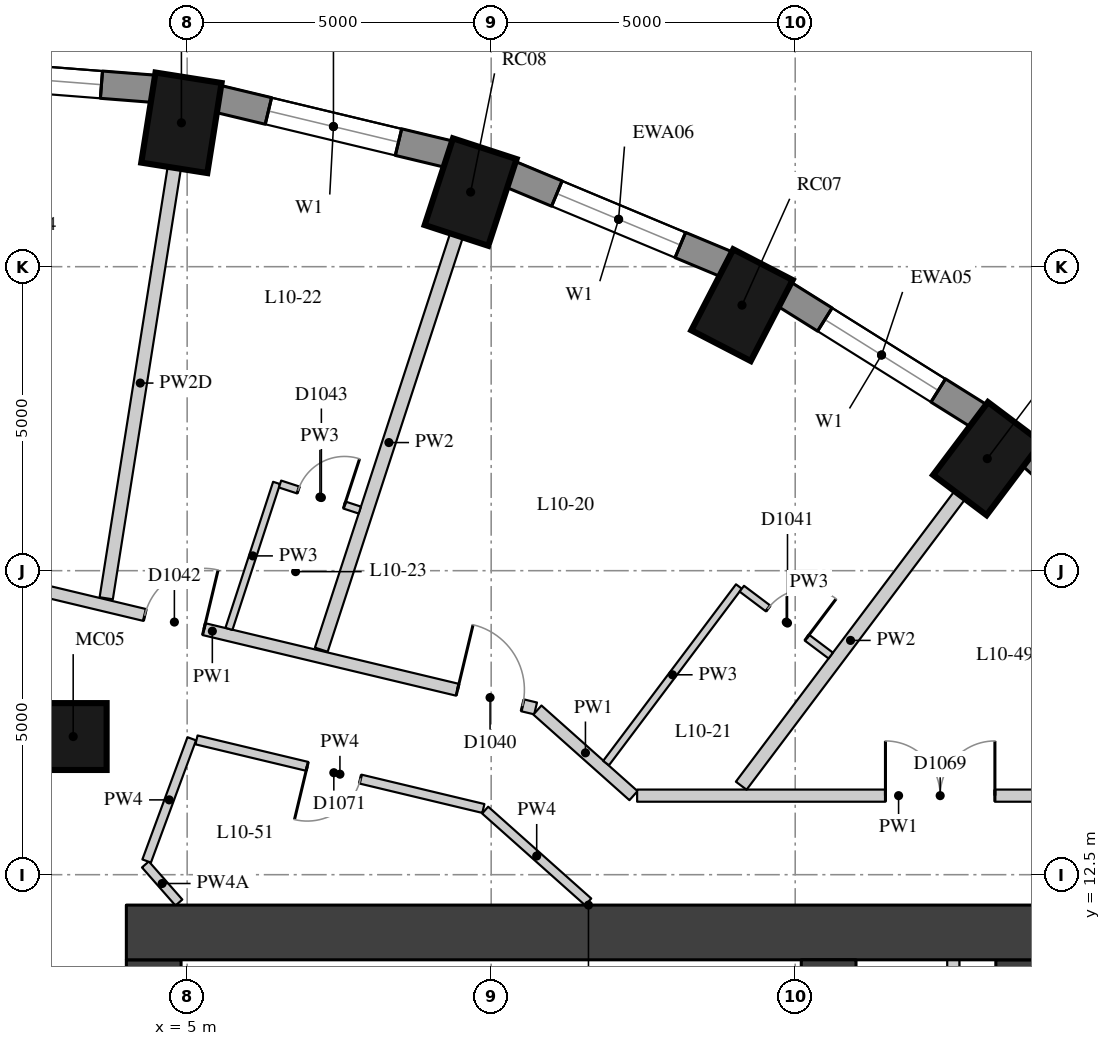
"""IFC4 building model, lengths in metres.
Left out: names, types, materials, properties, quantities, classifications, styles, units other than length and angle.
Written with IfcOpenShell. Run it as: python <this file> out.ifc"""

import sys

from ifc_helpers import new_model, si_unit, direction, frame, frame_2d, origin, origin_2d, place, context, subcontext, project, spatial, rectangle, extrude, element, fill, save


model = new_model("IFC4")
c1 = context("Model", 3, precision=1e-05, world=origin(), true_north=direction((0.0, 1.0)))
c2 = subcontext(c1, "Body", "Model", "MODEL_VIEW")
j1 = project(units=[si_unit("LENGTHUNIT", "METRE"), si_unit("PLANEANGLEUNIT", "RADIAN")], contexts=[c1])
p1 = place(None, origin())
s1 = spatial("IfcSite", under=j1, at=p1, CompositionType="ELEMENT")
p2 = place(p1, origin())
s2 = spatial("IfcBuilding", under=s1, at=p2, CompositionType="ELEMENT")
p3 = place(p2, frame((0.0, 0.0, 41.5)))
s3 = spatial("IfcBuildingStorey", under=s2, at=p3, CompositionType="ELEMENT", Elevation=41.5)
for number, where, z_axis, x_axis in (
    (1, (18.159, 19.343, 0.0), (0.0, 0.0, 1.0), (0.601, 0.799, 0.0)),
    (2, (14.125, 21.867, 0.0), (0.0, 0.0, 1.0), (0.46, 0.888, 0.0)),
    (3, (9.662, 23.727, 0.0), (0.0, 0.0, 1.0), (0.31, 0.951, 0.0)),
    (4, (4.906, 24.866, 0.0), (0.0, 0.0, 1.0), (0.156, 0.988, 0.0)),
):
    element("IfcColumn", number, at=place(p3, frame(where, z_axis=z_axis, x_axis=x_axis)), inside=s3, PredefinedType="COLUMN", context=c2, shape_type="SweptSolid", body=[
        extrude(rectangle(XDim=1.5, YDim=1.1, at=origin_2d()), origin(), (0.0, 0.0, 1.0), 3.3),
    ])
p4 = place(p3, frame((3.126, 14.772, 0.0), z_axis=(0.0, 0.0, 1.0), x_axis=(1.0, 0.0, 0.0)))
e5 = element("IfcColumn", 5, at=p4, inside=s3, PredefinedType="COLUMN", context=c2, shape_type="SweptSolid", body=[
    extrude(rectangle(XDim=1.1, YDim=1.1, at=origin_2d()), origin(), (0.0, 0.0, 1.0), 3.3),
])
p5 = place(p3, frame((21.627, 16.943, 0.0), z_axis=(0.0, 0.0, 1.0), x_axis=(-0.745526233716, 0.66647628228, 0.0)))
e6 = element("IfcWall", 6, at=p5, inside=s3, PredefinedType="SOLIDWALL", context=c2, shape_type="SweptSolid", body=[
    extrude(rectangle(XDim=3.697, YDim=0.45, at=frame_2d((1.848, 0.0))), origin(), (0.0, 0.0, 1.0), 3.02),
])
p6 = place(p3, frame((18.023, 20.044, 0.0), z_axis=(0.0, 0.0, 1.0), x_axis=(-0.847635480093, 0.530579016629, 0.0)))
e7 = element("IfcWall", 7, at=p6, inside=s3, PredefinedType="SOLIDWALL", context=c2, shape_type="SweptSolid", body=[
    extrude(rectangle(XDim=3.782, YDim=0.45, at=frame_2d((1.891, 0.0))), origin(), (0.0, 0.0, 1.0), 3.02),
])
p7 = place(p6, frame((0.791, 0.0, 0.4)))
e8 = element("IfcOpeningElement", 8, at=p7, cuts=e7, PredefinedType="OPENING", context=c2, shape_type="SweptSolid", body=[
    extrude(rectangle(XDim=2.2, YDim=1.75, at=frame_2d((1.1, 0.875))), frame((0.0, 0.235, 0.0), z_axis=(0.0, -1.0, 0.0), x_axis=(1.0, 0.0, 0.0)), (0.0, 0.0, 1.0), 0.47),
])
p8 = place(p3, frame((13.875, 22.537, 0.0), z_axis=(0.0, 0.0, 1.0), x_axis=(-0.923031964282, 0.384723267966, 0.0)))
e9 = element("IfcWall", 9, at=p8, inside=s3, PredefinedType="SOLIDWALL", context=c2, shape_type="SweptSolid", body=[
    extrude(rectangle(XDim=3.856, YDim=0.45, at=frame_2d((1.928, 0.0))), origin(), (0.0, 0.0, 1.0), 3.02),
])
p9 = place(p8, frame((0.828, 0.0, 0.4)))
e10 = element("IfcOpeningElement", 10, at=p9, cuts=e9, PredefinedType="OPENING", context=c2, shape_type="SweptSolid", body=[
    extrude(rectangle(XDim=2.2, YDim=1.75, at=frame_2d((1.1, 0.875))), frame((0.0, 0.235, 0.0), z_axis=(0.0, -1.0, 0.0), x_axis=(1.0, 0.0, 0.0)), (0.0, 0.0, 1.0), 0.47),
])
p10 = place(p3, frame((9.308, 24.35, 0.0), z_axis=(0.0, 0.0, 1.0), x_axis=(-0.972496561493, 0.232917233979, 0.0)))
e11 = element("IfcWall", 11, at=p10, inside=s3, PredefinedType="SOLIDWALL", context=c2, shape_type="SweptSolid", body=[
    extrude(rectangle(XDim=3.911, YDim=0.45, at=frame_2d((1.956, 0.0))), origin(), (0.0, 0.0, 1.0), 3.02),
])
p11 = place(p10, frame((0.855, 0.0, 0.4)))
e12 = element("IfcOpeningElement", 12, at=p11, cuts=e11, PredefinedType="OPENING", context=c2, shape_type="SweptSolid", body=[
    extrude(rectangle(XDim=2.2, YDim=1.75, at=frame_2d((1.1, 0.875))), frame((0.0, 0.235, 0.0), z_axis=(0.0, -1.0, 0.0), x_axis=(1.0, 0.0, 0.0)), (0.0, 0.0, 1.0), 0.47),
])
p12 = place(p3, frame((4.457, 25.426, 0.0), z_axis=(0.0, 0.0, 1.0), x_axis=(-0.996955972145, 0.077966592873, 0.0)))
e13 = element("IfcWall", 13, at=p12, inside=s3, PredefinedType="SOLIDWALL", context=c2, shape_type="SweptSolid", body=[
    extrude(rectangle(XDim=3.939, YDim=0.45, at=frame_2d((1.97, 0.0))), origin(), (0.0, 0.0, 1.0), 3.02),
])
p13 = place(p12, frame((0.87, 0.0, 0.4)))
e14 = element("IfcOpeningElement", 14, at=p13, cuts=e13, PredefinedType="OPENING", context=c2, shape_type="SweptSolid", body=[
    extrude(rectangle(XDim=2.2, YDim=1.75, at=frame_2d((1.1, 0.875))), frame((0.0, 0.235, 0.0), z_axis=(0.0, -1.0, 0.0), x_axis=(1.0, 0.0, 0.0)), (0.0, 0.0, 1.0), 0.47),
])
p14 = place(p3, frame((4.45, -11.1, 0.0), z_axis=(0.0, 0.0, 1.0), x_axis=(0.0, 1.0, 0.0)))
e15 = element("IfcWall", 15, at=p14, inside=s3, PredefinedType="SHEAR", context=c2, shape_type="SweptSolid", body=[
    extrude(rectangle(XDim=22.2, YDim=0.9, at=frame_2d((11.1, 0.0))), origin(), (0.0, 0.0, 1.0), 3.02),
])
p15 = place(p14, frame((2.35, 0.0, 0.0)))
e16 = element("IfcOpeningElement", 16, at=p15, cuts=e15, PredefinedType="OPENING", context=c2, shape_type="SweptSolid", body=[
    extrude(rectangle(XDim=1.5, YDim=2.1, at=frame_2d((0.75, 1.05))), frame((0.0, 0.46, 0.0), z_axis=(0.0, -1.0, 0.0), x_axis=(1.0, 0.0, 0.0)), (0.0, 0.0, 1.0), 0.92),
])
p16 = place(p14, frame((5.45, 0.0, 0.0)))
e17 = element("IfcOpeningElement", 17, at=p16, cuts=e15, PredefinedType="OPENING", context=c2, shape_type="SweptSolid", body=[
    extrude(rectangle(XDim=1.8, YDim=2.1, at=frame_2d((0.9, 1.05))), frame((0.0, 0.46, 0.0), z_axis=(0.0, -1.0, 0.0), x_axis=(1.0, 0.0, 0.0)), (0.0, 0.0, 1.0), 0.92),
])
p17 = place(p14, frame((7.95, 0.0, 0.0)))
e18 = element("IfcOpeningElement", 18, at=p17, cuts=e15, PredefinedType="OPENING", context=c2, shape_type="SweptSolid", body=[
    extrude(rectangle(XDim=1.1, YDim=2.1, at=frame_2d((0.55, 1.05))), frame((0.0, 0.46, 0.0), z_axis=(0.0, -1.0, 0.0), x_axis=(1.0, 0.0, 0.0)), (0.0, 0.0, 1.0), 0.92),
])
p18 = place(p14, frame((10.6, 0.0, 0.0)))
e19 = element("IfcOpeningElement", 19, at=p18, cuts=e15, PredefinedType="OPENING", context=c2, shape_type="SweptSolid", body=[
    extrude(rectangle(XDim=1.0, YDim=2.1, at=frame_2d((0.5, 1.05))), frame((0.0, 0.46, 0.0), z_axis=(0.0, -1.0, 0.0), x_axis=(1.0, 0.0, 0.0)), (0.0, 0.0, 1.0), 0.92),
])
p19 = place(p14, frame((13.15, 0.0, 0.0)))
e20 = element("IfcOpeningElement", 20, at=p19, cuts=e15, PredefinedType="OPENING", context=c2, shape_type="SweptSolid", body=[
    extrude(rectangle(XDim=1.1, YDim=2.1, at=frame_2d((0.55, 1.05))), frame((0.0, 0.46, 0.0), z_axis=(0.0, -1.0, 0.0), x_axis=(1.0, 0.0, 0.0)), (0.0, 0.0, 1.0), 0.92),
])
p20 = place(p14, frame((14.95, 0.0, 0.0)))
e21 = element("IfcOpeningElement", 21, at=p20, cuts=e15, PredefinedType="OPENING", context=c2, shape_type="SweptSolid", body=[
    extrude(rectangle(XDim=1.8, YDim=2.1, at=frame_2d((0.9, 1.05))), frame((0.0, 0.46, 0.0), z_axis=(0.0, -1.0, 0.0), x_axis=(1.0, 0.0, 0.0)), (0.0, 0.0, 1.0), 0.92),
])
p21 = place(p14, frame((18.35, 0.0, 0.0)))
e22 = element("IfcOpeningElement", 22, at=p21, cuts=e15, PredefinedType="OPENING", context=c2, shape_type="SweptSolid", body=[
    extrude(rectangle(XDim=1.5, YDim=2.1, at=frame_2d((0.75, 1.05))), frame((0.0, 0.46, 0.0), z_axis=(0.0, -1.0, 0.0), x_axis=(1.0, 0.0, 0.0)), (0.0, 0.0, 1.0), 0.92),
])
p22 = place(p3, frame((18.75, -11.1, 0.0), z_axis=(0.0, 0.0, 1.0), x_axis=(0.0, 1.0, 0.0)))
e23 = element("IfcWall", 23, at=p22, inside=s3, PredefinedType="SHEAR", context=c2, shape_type="SweptSolid", body=[
    extrude(rectangle(XDim=22.2, YDim=0.9, at=frame_2d((11.1, 0.0))), origin(), (0.0, 0.0, 1.0), 3.02),
])
p23 = place(p22, frame((15.675, 0.0, 0.0)))
e24 = element("IfcOpeningElement", 24, at=p23, cuts=e23, PredefinedType="OPENING", context=c2, shape_type="SweptSolid", body=[
    extrude(rectangle(XDim=1.5, YDim=2.1, at=frame_2d((0.75, 1.05))), frame((0.0, 0.46, 0.0), z_axis=(0.0, -1.0, 0.0), x_axis=(1.0, 0.0, 0.0)), (0.0, 0.0, 1.0), 0.92),
])
p24 = place(p22, frame((4.775, 0.0, 0.0)))
e25 = element("IfcOpeningElement", 25, at=p24, cuts=e23, PredefinedType="OPENING", context=c2, shape_type="SweptSolid", body=[
    extrude(rectangle(XDim=1.5, YDim=2.1, at=frame_2d((0.75, 1.05))), frame((0.0, 0.46, 0.0), z_axis=(0.0, -1.0, 0.0), x_axis=(1.0, 0.0, 0.0)), (0.0, 0.0, 1.0), 0.92),
])
p25 = place(p3, frame((4.0, 11.55, 0.0), z_axis=(0.0, 0.0, 1.0), x_axis=(1.0, 0.0, 0.0)))
e26 = element("IfcWall", 26, at=p25, inside=s3, PredefinedType="SHEAR", context=c2, shape_type="SweptSolid", body=[
    extrude(rectangle(XDim=15.2, YDim=0.9, at=frame_2d((7.6, 0.0))), origin(), (0.0, 0.0, 1.0), 3.02),
])
p26 = place(p3, frame((15.55, -11.1, 0.0), z_axis=(0.0, 0.0, 1.0), x_axis=(0.0, 1.0, 0.0)))
e27 = element("IfcWall", 27, at=p26, inside=s3, PredefinedType="SHEAR", context=c2, shape_type="SweptSolid", body=[
    extrude(rectangle(XDim=22.2, YDim=0.9, at=frame_2d((11.1, 0.0))), origin(), (0.0, 0.0, 1.0), 3.02),
])
p27 = place(p26, frame((15.6, 0.0, 0.0)))
e28 = element("IfcOpeningElement", 28, at=p27, cuts=e27, PredefinedType="OPENING", context=c2, shape_type="SweptSolid", body=[
    extrude(rectangle(XDim=1.0, YDim=2.1, at=frame_2d((0.5, 1.05))), frame((0.0, 0.46, 0.0), z_axis=(0.0, -1.0, 0.0), x_axis=(1.0, 0.0, 0.0)), (0.0, 0.0, 1.0), 0.92),
])
p28 = place(p26, frame((5.6, 0.0, 0.0)))
e29 = element("IfcOpeningElement", 29, at=p28, cuts=e27, PredefinedType="OPENING", context=c2, shape_type="SweptSolid", body=[
    extrude(rectangle(XDim=1.0, YDim=2.1, at=frame_2d((0.5, 1.05))), frame((0.0, 0.46, 0.0), z_axis=(0.0, -1.0, 0.0), x_axis=(1.0, 0.0, 0.0)), (0.0, 0.0, 1.0), 0.92),
])
p29 = place(p3, frame((17.6, 6.4, 0.0), z_axis=(0.0, 0.0, 1.0), x_axis=(0.0, 1.0, 0.0)))
e30 = element("IfcWall", 30, at=p29, inside=s3, PredefinedType="PARTITIONING", context=c2, shape_type="SweptSolid", body=[
    extrude(rectangle(XDim=4.7, YDim=0.2, at=frame_2d((2.35, 0.0))), origin(), (0.0, 0.0, 1.0), 3.02),
])
p30 = place(p3, frame((0.098, 17.777, 0.0), z_axis=(0.0, 0.0, 1.0), x_axis=(0.97258196627, -0.232560355362, 0.0)))
e31 = element("IfcWall", 31, at=p30, inside=s3, PredefinedType="PARTITIONING", context=c2, shape_type="SweptSolid", body=[
    extrude(rectangle(XDim=10.933, YDim=0.2, at=frame_2d((5.466, 0.0))), origin(), (0.0, 0.0, 1.0), 3.02),
])
p31 = place(p30, frame((9.613, 0.0, 0.0)))
e32 = element("IfcOpeningElement", 32, at=p31, cuts=e31, PredefinedType="OPENING", context=c2, shape_type="SweptSolid", body=[
    extrude(rectangle(XDim=1.1, YDim=2.1, at=frame_2d((0.55, 1.05))), frame((0.0, 0.11, 0.0), z_axis=(0.0, -1.0, 0.0), x_axis=(1.0, 0.0, 0.0)), (0.0, 0.0, 1.0), 0.22),
])
p32 = place(p30, frame((4.325, 0.0, 0.0)))
e33 = element("IfcOpeningElement", 33, at=p32, cuts=e31, PredefinedType="OPENING", context=c2, shape_type="SweptSolid", body=[
    extrude(rectangle(XDim=1.0, YDim=2.1, at=frame_2d((0.5, 1.05))), frame((0.0, 0.11, 0.0), z_axis=(0.0, -1.0, 0.0), x_axis=(1.0, 0.0, 0.0)), (0.0, 0.0, 1.0), 0.22),
])
p33 = place(p30, frame((1.276, 0.0, 0.0)))
e34 = element("IfcOpeningElement", 34, at=p33, cuts=e31, PredefinedType="OPENING", context=c2, shape_type="SweptSolid", body=[
    extrude(rectangle(XDim=0.9, YDim=2.1, at=frame_2d((0.45, 1.05))), frame((0.0, 0.11, 0.0), z_axis=(0.0, -1.0, 0.0), x_axis=(1.0, 0.0, 0.0)), (0.0, 0.0, 1.0), 0.22),
])
p34 = place(p3, frame((10.76, 15.208, 0.0), z_axis=(0.0, 0.0, 1.0), x_axis=(0.746600460158, -0.665272690626, 0.0)))
e35 = element("IfcWall", 35, at=p34, inside=s3, PredefinedType="PARTITIONING", context=c2, shape_type="SweptSolid", body=[
    extrude(rectangle(XDim=2.116, YDim=0.2, at=frame_2d((1.058, 0.0))), origin(), (0.0, 0.0, 1.0), 3.02),
])
p35 = place(p3, frame((12.4, 13.8, 0.0), z_axis=(0.0, 0.0, 1.0), x_axis=(1.0, 0.0, 0.0)))
e36 = element("IfcWall", 36, at=p35, inside=s3, PredefinedType="PARTITIONING", context=c2, shape_type="SweptSolid", body=[
    extrude(rectangle(XDim=8.6, YDim=0.2, at=frame_2d((4.3, 0.0))), origin(), (0.0, 0.0, 1.0), 3.02),
])
p36 = place(p35, frame((4.084, 0.0, 0.0)))
e37 = element("IfcOpeningElement", 37, at=p36, cuts=e36, PredefinedType="OPENING", context=c2, shape_type="SweptSolid", body=[
    extrude(rectangle(XDim=1.8, YDim=2.1, at=frame_2d((0.9, 1.05))), frame((0.0, 0.11, 0.0), z_axis=(0.0, -1.0, 0.0), x_axis=(1.0, 0.0, 0.0)), (0.0, 0.0, 1.0), 0.22),
])
p37 = place(p3, frame((4.865, 12.042, 0.0), z_axis=(0.0, 0.0, 1.0), x_axis=(-0.660014599896, 0.751252772323, 0.0)))
e38 = element("IfcWall", 38, at=p37, inside=s3, PredefinedType="PARTITIONING", context=c2, shape_type="SweptSolid", body=[
    extrude(rectangle(XDim=0.835, YDim=0.15, at=frame_2d((0.417, 0.0))), origin(), (0.0, 0.0, 1.0), 2.57),
])
p38 = place(p3, frame((4.334, 12.725, 0.0), z_axis=(0.0, 0.0, 1.0), x_axis=(0.346111853175, 0.938193255727, 0.0)))
e39 = element("IfcWall", 39, at=p38, inside=s3, PredefinedType="PARTITIONING", context=c2, shape_type="SweptSolid", body=[
    extrude(rectangle(XDim=2.143, YDim=0.15, at=frame_2d((1.072, 0.0))), origin(), (0.0, 0.0, 1.0), 3.02),
])
p39 = place(p3, frame((5.154, 14.717, 0.0), z_axis=(0.0, 0.0, 1.0), x_axis=(0.972587058657, -0.232539057651, 0.0)))
e40 = element("IfcWall", 40, at=p39, inside=s3, PredefinedType="PARTITIONING", context=c2, shape_type="SweptSolid", body=[
    extrude(rectangle(XDim=4.851, YDim=0.15, at=frame_2d((2.425, 0.0))), origin(), (0.0, 0.0, 1.0), 3.02),
])
p40 = place(p39, frame((1.872, 0.0, 0.0)))
e41 = element("IfcOpeningElement", 41, at=p40, cuts=e40, PredefinedType="OPENING", context=c2, shape_type="SweptSolid", body=[
    extrude(rectangle(XDim=0.9, YDim=2.1, at=frame_2d((0.45, 1.05))), frame((0.0, 0.085, 0.0), z_axis=(0.0, -1.0, 0.0), x_axis=(1.0, 0.0, 0.0)), (0.0, 0.0, 1.0), 0.17),
])
p41 = place(p3, frame((9.901, 13.562, 0.0), z_axis=(0.0, 0.0, 1.0), x_axis=(0.746696753395, -0.665164610054, 0.0)))
e42 = element("IfcWall", 42, at=p41, inside=s3, PredefinedType="PARTITIONING", context=c2, shape_type="SweptSolid", body=[
    extrude(rectangle(XDim=2.27, YDim=0.15, at=frame_2d((1.135, 0.0))), origin(), (0.0, 0.0, 1.0), 3.02),
])
p42 = place(p3, frame((17.708, 18.743, 0.0), z_axis=(0.0, 0.0, 1.0), x_axis=(-0.601181461694, -0.799112539081, 0.0)))
e43 = element("IfcWall", 43, at=p42, inside=s3, PredefinedType="PARTITIONING", context=c2, shape_type="SweptSolid", body=[
    extrude(rectangle(XDim=5.981, YDim=0.22, at=frame_2d((2.99, 0.0))), origin(), (0.0, 0.0, 1.0), 3.02),
])
p43 = place(p3, frame((9.429, 23.014, 0.0), z_axis=(0.0, 0.0, 1.0), x_axis=(-0.310212691368, -0.950667179466, 0.0)))
e44 = element("IfcWall", 44, at=p43, inside=s3, PredefinedType="PARTITIONING", context=c2, shape_type="SweptSolid", body=[
    extrude(rectangle(XDim=7.167, YDim=0.22, at=frame_2d((3.583, 0.0))), origin(), (0.0, 0.0, 1.0), 3.02),
])
p44 = place(p3, frame((4.788, 24.125, 0.0), z_axis=(0.0, 0.0, 1.0), x_axis=(-0.156146236489, -0.987733948404, 0.0)))
e45 = element("IfcWall", 45, at=p44, inside=s3, PredefinedType="PARTITIONING", context=c2, shape_type="SweptSolid", body=[
    extrude(rectangle(XDim=7.167, YDim=0.22, at=frame_2d((3.583, 0.0))), origin(), (0.0, 0.0, 1.0), 2.47),
])
p45 = place(p3, frame((11.889, 14.336, 0.0), z_axis=(0.0, 0.0, 1.0), x_axis=(0.601160173805, 0.799128553758, 0.0)))
e46 = element("IfcWall", 46, at=p45, inside=s3, PredefinedType="PARTITIONING", context=c2, shape_type="SweptSolid", body=[
    extrude(rectangle(XDim=3.634, YDim=0.12, at=frame_2d((1.817, 0.0))), origin(), (0.0, 0.0, 1.0), 3.02),
])
p46 = place(p3, frame((5.687, 16.543, 0.0), z_axis=(0.0, 0.0, 1.0), x_axis=(0.310246659943, 0.950656094492, 0.0)))
e47 = element("IfcWall", 47, at=p46, inside=s3, PredefinedType="PARTITIONING", context=c2, shape_type="SweptSolid", body=[
    extrude(rectangle(XDim=2.525, YDim=0.12, at=frame_2d((1.263, 0.0))), origin(), (0.0, 0.0, 1.0), 3.02),
])
p47 = place(p3, frame((14.122, 17.204, 0.0), z_axis=(0.0, 0.0, 1.0), x_axis=(0.799134663307, -0.601152052231, 0.0)))
e48 = element("IfcWall", 48, at=p47, inside=s3, PredefinedType="PARTITIONING", context=c2, shape_type="SweptSolid", body=[
    extrude(rectangle(XDim=1.83, YDim=0.12, at=frame_2d((0.915, 0.0))), origin(), (0.0, 0.0, 1.0), 3.02),
])
p48 = place(p47, frame((0.54, 0.0, 0.0)))
e49 = element("IfcOpeningElement", 49, at=p48, cuts=e48, PredefinedType="OPENING", context=c2, shape_type="SweptSolid", body=[
    extrude(rectangle(XDim=0.8, YDim=2.1, at=frame_2d((0.4, 1.05))), frame((0.0, 0.07, 0.0), z_axis=(0.0, -1.0, 0.0), x_axis=(1.0, 0.0, 0.0)), (0.0, 0.0, 1.0), 0.14),
])
p49 = place(p3, frame((6.528, 18.925, 0.0), z_axis=(0.0, 0.0, 1.0), x_axis=(0.950628893115, -0.310329997864, 0.0)))
e50 = element("IfcWall", 50, at=p49, inside=s3, PredefinedType="PARTITIONING", context=c2, shape_type="SweptSolid", body=[
    extrude(rectangle(XDim=1.38, YDim=0.12, at=frame_2d((0.69, 0.0))), origin(), (0.0, 0.0, 1.0), 3.02),
])
p50 = place(p49, frame((0.315, 0.0, 0.0)))
e51 = element("IfcOpeningElement", 51, at=p50, cuts=e50, PredefinedType="OPENING", context=c2, shape_type="SweptSolid", body=[
    extrude(rectangle(XDim=0.8, YDim=2.1, at=frame_2d((0.4, 1.05))), frame((0.0, 0.07, 0.0), z_axis=(0.0, -1.0, 0.0), x_axis=(1.0, 0.0, 0.0)), (0.0, 0.0, 1.0), 0.14),
])
p51 = place(p7, origin())
e52 = element("IfcWindow", 52, at=p51, inside=s3, PartitioningType="SINGLE_PANEL", PredefinedType="WINDOW", context=c2, shape_type="SweptSolid", body=[
    extrude(rectangle(XDim=2.2, YDim=1.75, at=frame_2d((1.1, 0.875))), frame((0.0, 0.035, 0.0), z_axis=(0.0, -1.0, 0.0), x_axis=(1.0, 0.0, 0.0)), (0.0, 0.0, 1.0), 0.06),
])
fill(e8, e52)
p52 = place(p9, origin())
e53 = element("IfcWindow", 53, at=p52, inside=s3, PartitioningType="SINGLE_PANEL", PredefinedType="WINDOW", context=c2, shape_type="SweptSolid", body=[
    extrude(rectangle(XDim=2.2, YDim=1.75, at=frame_2d((1.1, 0.875))), frame((0.0, 0.035, 0.0), z_axis=(0.0, -1.0, 0.0), x_axis=(1.0, 0.0, 0.0)), (0.0, 0.0, 1.0), 0.06),
])
fill(e10, e53)
p53 = place(p11, origin())
e54 = element("IfcWindow", 54, at=p53, inside=s3, PartitioningType="SINGLE_PANEL", PredefinedType="WINDOW", context=c2, shape_type="SweptSolid", body=[
    extrude(rectangle(XDim=2.2, YDim=1.75, at=frame_2d((1.1, 0.875))), frame((0.0, 0.035, 0.0), z_axis=(0.0, -1.0, 0.0), x_axis=(1.0, 0.0, 0.0)), (0.0, 0.0, 1.0), 0.06),
])
fill(e12, e54)
p54 = place(p13, origin())
e55 = element("IfcWindow", 55, at=p54, inside=s3, PartitioningType="SINGLE_PANEL", PredefinedType="WINDOW", context=c2, shape_type="SweptSolid", body=[
    extrude(rectangle(XDim=2.2, YDim=1.75, at=frame_2d((1.1, 0.875))), frame((0.0, 0.035, 0.0), z_axis=(0.0, -1.0, 0.0), x_axis=(1.0, 0.0, 0.0)), (0.0, 0.0, 1.0), 0.06),
])
fill(e14, e55)
p55 = place(p31, origin())
e56 = element("IfcDoor", 56, at=p55, inside=s3, OperationType="SINGLE_SWING_LEFT", PredefinedType="DOOR", context=c2, shape_type="SweptSolid", body=[
    extrude(rectangle(XDim=1.1, YDim=2.1, at=frame_2d((0.55, 1.05))), frame((0.0, 0.025, 0.0), z_axis=(0.0, -1.0, 0.0), x_axis=(1.0, 0.0, 0.0)), (0.0, 0.0, 1.0), 0.05),
])
fill(e32, e56)
p56 = place(p48, origin())
e57 = element("IfcDoor", 57, at=p56, inside=s3, OperationType="SINGLE_SWING_RIGHT", PredefinedType="DOOR", context=c2, shape_type="SweptSolid", body=[
    extrude(rectangle(XDim=0.8, YDim=2.1, at=frame_2d((0.4, 1.05))), frame((0.0, 0.025, 0.0), z_axis=(0.0, -1.0, 0.0), x_axis=(1.0, 0.0, 0.0)), (0.0, 0.0, 1.0), 0.05),
])
fill(e49, e57)
p57 = place(p32, origin())
e58 = element("IfcDoor", 58, at=p57, inside=s3, OperationType="SINGLE_SWING_RIGHT", PredefinedType="DOOR", context=c2, shape_type="SweptSolid", body=[
    extrude(rectangle(XDim=1.0, YDim=2.1, at=frame_2d((0.5, 1.05))), frame((0.0, 0.025, 0.0), z_axis=(0.0, -1.0, 0.0), x_axis=(1.0, 0.0, 0.0)), (0.0, 0.0, 1.0), 0.05),
])
fill(e33, e58)
p58 = place(p50, origin())
e59 = element("IfcDoor", 59, at=p58, inside=s3, OperationType="SINGLE_SWING_RIGHT", PredefinedType="DOOR", context=c2, shape_type="SweptSolid", body=[
    extrude(rectangle(XDim=0.8, YDim=2.1, at=frame_2d((0.4, 1.05))), frame((0.0, 0.025, 0.0), z_axis=(0.0, -1.0, 0.0), x_axis=(1.0, 0.0, 0.0)), (0.0, 0.0, 1.0), 0.05),
])
fill(e51, e59)
p59 = place(p36, origin())
e60 = element("IfcDoor", 60, at=p59, inside=s3, OperationType="DOUBLE_DOOR_SINGLE_SWING", PredefinedType="DOOR", context=c2, shape_type="SweptSolid", body=[
    extrude(rectangle(XDim=1.8, YDim=2.1, at=frame_2d((0.9, 1.05))), frame((0.0, 0.025, 0.0), z_axis=(0.0, -1.0, 0.0), x_axis=(1.0, 0.0, 0.0)), (0.0, 0.0, 1.0), 0.05),
])
fill(e37, e60)
p60 = place(p40, origin())
e61 = element("IfcDoor", 61, at=p60, inside=s3, OperationType="SINGLE_SWING_RIGHT", PredefinedType="DOOR", context=c2, shape_type="SweptSolid", body=[
    extrude(rectangle(XDim=0.9, YDim=2.1, at=frame_2d((0.45, 1.05))), frame((0.0, 0.025, 0.0), z_axis=(0.0, -1.0, 0.0), x_axis=(1.0, 0.0, 0.0)), (0.0, 0.0, 1.0), 0.05),
])
fill(e41, e61)
save(model, sys.argv[1])
